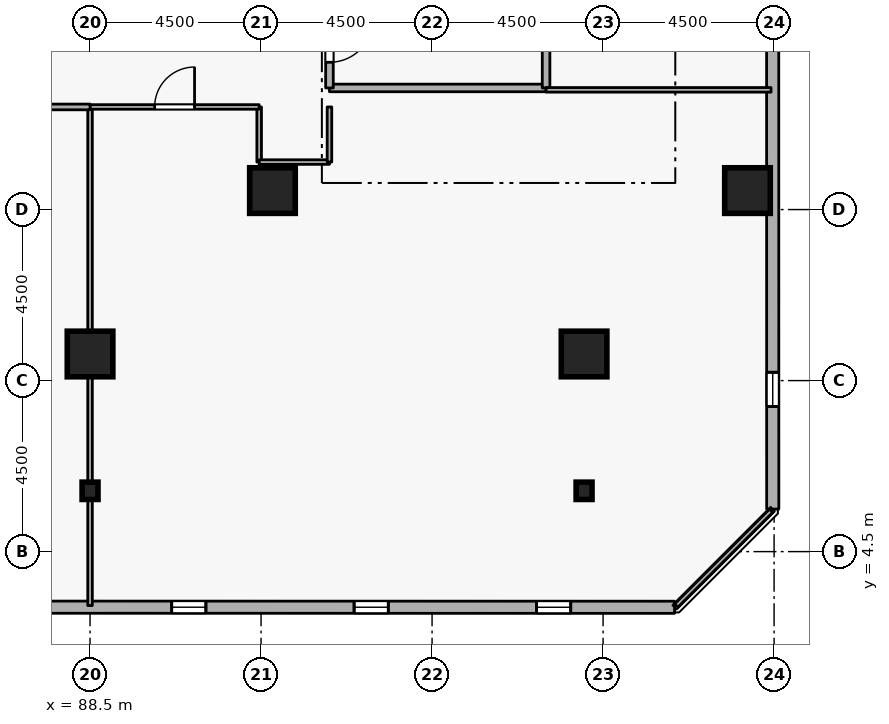
"""IFC4 building model, lengths in metres.
Left out: names, types, materials, properties, quantities, classifications, styles, units other than length and angle.
Written with IfcOpenShell. Run it as: python <this file> out.ifc"""

import sys

from ifc_helpers import new_model, si_unit, direction, frame, frame_2d, origin, origin_2d, place, context, subcontext, project, spatial, rectangle, i_section, extrude, element, fill, save


model = new_model("IFC4")
c1 = context("Model", 3, precision=1e-05, world=origin(), true_north=direction((0.0, 1.0)))
c2 = subcontext(c1, "Body", "Model", "MODEL_VIEW")
j1 = project(units=[si_unit("LENGTHUNIT", "METRE"), si_unit("PLANEANGLEUNIT", "RADIAN")], contexts=[c1])
p1 = place(None, origin())
s1 = spatial("IfcSite", under=j1, at=p1, CompositionType="ELEMENT")
p2 = place(p1, origin())
s2 = spatial("IfcBuilding", under=s1, at=p2, CompositionType="ELEMENT")
p3 = place(p2, frame((0.0, 0.0, 98.1)))
s3 = spatial("IfcBuildingStorey", under=s2, at=p3, CompositionType="ELEMENT", Elevation=98.1)
for number, where, z_axis, x_axis in (
    (1, (105.8, 14.0, 0.0), (0.0, 0.0, 1.0), (1.0, 0.0, 0.0)),
    (2, (101.5, 9.7, 0.0), (0.0, 0.0, 1.0), (1.0, 0.0, 0.0)),
    (3, (88.5, 9.7, 0.0), (0.0, 0.0, 1.0), (1.0, 0.0, 0.0)),
    (4, (93.3, 14.0, 0.0), (0.0, 0.0, 1.0), (1.0, 0.0, 0.0)),
):
    element("IfcColumn", number, at=place(p3, frame(where, z_axis=z_axis, x_axis=x_axis)), inside=s3, PredefinedType="COLUMN", context=c2, shape_type="SweptSolid", body=[
        extrude(rectangle(XDim=1.2, YDim=1.2, at=origin_2d()), origin(), (0.0, 0.0, 1.0), 3.6),
    ])
for number, where, z_axis, x_axis in (
    (5, (101.5, 6.1, 0.0), (0.0, 0.0, 1.0), (1.0, 0.0, 0.0)),
    (6, (88.5, 6.1, 0.0), (0.0, 0.0, 1.0), (1.0, 0.0, 0.0)),
):
    element("IfcColumn", number, at=place(p3, frame(where, z_axis=z_axis, x_axis=x_axis)), inside=s3, PredefinedType="COLUMN", context=c2, shape_type="SweptSolid", body=[
        extrude(i_section(OverallWidth=0.418, OverallDepth=0.456, WebThickness=0.042, FlangeThickness=0.067, FilletRadius=0.015, at=origin_2d()), origin(), (0.0, 0.0, 1.0), 3.6),
    ])
p4 = place(p3, frame((68.748, 3.041, 0.0), z_axis=(0.0, 0.0, 1.0), x_axis=(0.999999989352, -0.000145929605, 0.0)))
e7 = element("IfcWall", 7, at=p4, inside=s3, PredefinedType="STANDARD", context=c2, shape_type="SweptSolid", body=[
    extrude(rectangle(XDim=35.133, YDim=0.32, at=frame_2d((17.566, 0.0))), origin(), (0.0, 0.0, 1.0), 2.7),
])
p5 = place(p4, frame((2.7, 0.0, 0.72)))
e8 = element("IfcOpeningElement", 8, at=p5, cuts=e7, PredefinedType="OPENING", context=c2, shape_type="SweptSolid", body=[
    extrude(rectangle(XDim=0.9, YDim=1.75, at=frame_2d((0.45, 0.875))), frame((0.0, 0.17, 0.0), z_axis=(0.0, -1.0, 0.0), x_axis=(1.0, 0.0, 0.0)), (0.0, 0.0, 1.0), 0.34),
])
p6 = place(p4, frame((7.5, 0.0, 0.72)))
e9 = element("IfcOpeningElement", 9, at=p6, cuts=e7, PredefinedType="OPENING", context=c2, shape_type="SweptSolid", body=[
    extrude(rectangle(XDim=0.9, YDim=1.75, at=frame_2d((0.45, 0.875))), frame((0.0, 0.17, 0.0), z_axis=(0.0, -1.0, 0.0), x_axis=(1.0, 0.0, 0.0)), (0.0, 0.0, 1.0), 0.34),
])
p7 = place(p4, frame((12.3, 0.0, 0.72)))
e10 = element("IfcOpeningElement", 10, at=p7, cuts=e7, PredefinedType="OPENING", context=c2, shape_type="SweptSolid", body=[
    extrude(rectangle(XDim=0.9, YDim=1.75, at=frame_2d((0.45, 0.875))), frame((0.0, 0.17, 0.0), z_axis=(0.0, -1.0, 0.0), x_axis=(1.0, 0.0, 0.0)), (0.0, 0.0, 1.0), 0.34),
])
p8 = place(p4, frame((17.1, 0.0, 0.72)))
e11 = element("IfcOpeningElement", 11, at=p8, cuts=e7, PredefinedType="OPENING", context=c2, shape_type="SweptSolid", body=[
    extrude(rectangle(XDim=0.9, YDim=1.75, at=frame_2d((0.45, 0.875))), frame((0.0, 0.17, 0.0), z_axis=(0.0, -1.0, 0.0), x_axis=(1.0, 0.0, 0.0)), (0.0, 0.0, 1.0), 0.34),
])
p9 = place(p4, frame((21.9, 0.0, 0.72)))
e12 = element("IfcOpeningElement", 12, at=p9, cuts=e7, PredefinedType="OPENING", context=c2, shape_type="SweptSolid", body=[
    extrude(rectangle(XDim=0.9, YDim=1.75, at=frame_2d((0.45, 0.875))), frame((0.0, 0.17, 0.0), z_axis=(0.0, -1.0, 0.0), x_axis=(1.0, 0.0, 0.0)), (0.0, 0.0, 1.0), 0.34),
])
p10 = place(p4, frame((26.7, 0.0, 0.72)))
e13 = element("IfcOpeningElement", 13, at=p10, cuts=e7, PredefinedType="OPENING", context=c2, shape_type="SweptSolid", body=[
    extrude(rectangle(XDim=0.9, YDim=1.75, at=frame_2d((0.45, 0.875))), frame((0.0, 0.17, 0.0), z_axis=(0.0, -1.0, 0.0), x_axis=(1.0, 0.0, 0.0)), (0.0, 0.0, 1.0), 0.34),
])
p11 = place(p4, frame((31.5, 0.0, 0.72)))
e14 = element("IfcOpeningElement", 14, at=p11, cuts=e7, PredefinedType="OPENING", context=c2, shape_type="SweptSolid", body=[
    extrude(rectangle(XDim=0.9, YDim=1.75, at=frame_2d((0.45, 0.875))), frame((0.0, 0.17, 0.0), z_axis=(0.0, -1.0, 0.0), x_axis=(1.0, 0.0, 0.0)), (0.0, 0.0, 1.0), 0.34),
])
p12 = place(p3, frame((106.465, 5.619, 0.0), z_axis=(0.0, 0.0, 1.0), x_axis=(-0.000145929605, 0.999999989352, 0.0)))
e15 = element("IfcWall", 15, at=p12, inside=s3, PredefinedType="STANDARD", context=c2, shape_type="SweptSolid", body=[
    extrude(rectangle(XDim=35.133, YDim=0.32, at=frame_2d((17.566, 0.0))), origin(), (0.0, 0.0, 1.0), 2.7),
])
p13 = place(p12, frame((2.7, 0.0, 0.72)))
e16 = element("IfcOpeningElement", 16, at=p13, cuts=e15, PredefinedType="OPENING", context=c2, shape_type="SweptSolid", body=[
    extrude(rectangle(XDim=0.9, YDim=1.75, at=frame_2d((0.45, 0.875))), frame((0.0, 0.17, 0.0), z_axis=(0.0, -1.0, 0.0), x_axis=(1.0, 0.0, 0.0)), (0.0, 0.0, 1.0), 0.34),
])
p14 = place(p12, frame((12.3, 0.0, 0.72)))
e17 = element("IfcOpeningElement", 17, at=p14, cuts=e15, PredefinedType="OPENING", context=c2, shape_type="SweptSolid", body=[
    extrude(rectangle(XDim=0.9, YDim=1.75, at=frame_2d((0.45, 0.875))), frame((0.0, 0.17, 0.0), z_axis=(0.0, -1.0, 0.0), x_axis=(1.0, 0.0, 0.0)), (0.0, 0.0, 1.0), 0.34),
])
p15 = place(p12, frame((17.1, 0.0, 0.72)))
e18 = element("IfcOpeningElement", 18, at=p15, cuts=e15, PredefinedType="OPENING", context=c2, shape_type="SweptSolid", body=[
    extrude(rectangle(XDim=0.9, YDim=1.75, at=frame_2d((0.45, 0.875))), frame((0.0, 0.17, 0.0), z_axis=(0.0, -1.0, 0.0), x_axis=(1.0, 0.0, 0.0)), (0.0, 0.0, 1.0), 0.34),
])
p16 = place(p12, frame((26.7, 0.0, 0.72)))
e19 = element("IfcOpeningElement", 19, at=p16, cuts=e15, PredefinedType="OPENING", context=c2, shape_type="SweptSolid", body=[
    extrude(rectangle(XDim=0.9, YDim=1.75, at=frame_2d((0.45, 0.875))), frame((0.0, 0.17, 0.0), z_axis=(0.0, -1.0, 0.0), x_axis=(1.0, 0.0, 0.0)), (0.0, 0.0, 1.0), 0.34),
])
p17 = place(p12, frame((31.5, 0.0, 0.72)))
e20 = element("IfcOpeningElement", 20, at=p17, cuts=e15, PredefinedType="OPENING", context=c2, shape_type="SweptSolid", body=[
    extrude(rectangle(XDim=0.9, YDim=1.75, at=frame_2d((0.45, 0.875))), frame((0.0, 0.17, 0.0), z_axis=(0.0, -1.0, 0.0), x_axis=(1.0, 0.0, 0.0)), (0.0, 0.0, 1.0), 0.34),
])
p18 = place(p3, frame((94.8, 16.7, 0.0), z_axis=(0.0, 0.0, 1.0), x_axis=(1.0, 0.0, 0.0)))
e21 = element("IfcWall", 21, at=p18, inside=s3, PredefinedType="STANDARD", context=c2, shape_type="SweptSolid", body=[
    extrude(rectangle(XDim=5.7, YDim=0.2, at=frame_2d((2.85, 0.0))), origin(), (0.0, 0.0, 1.0), 3.3),
])
p19 = place(p3, frame((100.5, 16.7, 0.0), z_axis=(0.0, 0.0, 1.0), x_axis=(0.0, 1.0, 0.0)))
e22 = element("IfcWall", 22, at=p19, inside=s3, PredefinedType="STANDARD", context=c2, shape_type="SweptSolid", body=[
    extrude(rectangle(XDim=2.5, YDim=0.2, at=frame_2d((1.25, 0.0))), origin(), (0.0, 0.0, 1.0), 3.3),
])
p20 = place(p3, frame((94.8, 19.2, 0.0), z_axis=(0.0, 0.0, 1.0), x_axis=(0.0, -1.0, 0.0)))
e23 = element("IfcWall", 23, at=p20, inside=s3, PredefinedType="STANDARD", context=c2, shape_type="SweptSolid", body=[
    extrude(rectangle(XDim=2.5, YDim=0.2, at=frame_2d((1.25, 0.0))), origin(), (0.0, 0.0, 1.0), 3.3),
])
p21 = place(p20, frame((0.675, 0.0, 0.0)))
e24 = element("IfcOpeningElement", 24, at=p21, cuts=e23, PredefinedType="OPENING", context=c2, shape_type="SweptSolid", body=[
    extrude(rectangle(XDim=1.15, YDim=2.1, at=frame_2d((0.575, 1.05))), frame((0.0, 0.11, 0.0), z_axis=(0.0, -1.0, 0.0), x_axis=(1.0, 0.0, 0.0)), (0.0, 0.0, 1.0), 0.22),
])
p22 = place(p3, frame((92.95, 16.2, 0.0), z_axis=(0.0, 0.0, 1.0), x_axis=(0.0, -1.0, 0.0)))
e25 = element("IfcWall", 25, at=p22, inside=s3, PredefinedType="PARTITIONING", context=c2, shape_type="SweptSolid", body=[
    extrude(rectangle(XDim=1.45, YDim=0.12, at=frame_2d((0.725, 0.0))), origin(), (0.0, 0.0, 1.0), 3.3),
])
p23 = place(p3, frame((92.95, 14.75, 0.0), z_axis=(0.0, 0.0, 1.0), x_axis=(1.0, 0.0, 0.0)))
e26 = element("IfcWall", 26, at=p23, inside=s3, PredefinedType="PARTITIONING", context=c2, shape_type="SweptSolid", body=[
    extrude(rectangle(XDim=1.85, YDim=0.12, at=frame_2d((0.925, 0.0))), origin(), (0.0, 0.0, 1.0), 3.3),
])
p24 = place(p3, frame((94.8, 14.75, 0.0), z_axis=(0.0, 0.0, 1.0), x_axis=(0.0, 1.0, 0.0)))
e27 = element("IfcWall", 27, at=p24, inside=s3, PredefinedType="PARTITIONING", context=c2, shape_type="SweptSolid", body=[
    extrude(rectangle(XDim=1.45, YDim=0.12, at=frame_2d((0.725, 0.0))), origin(), (0.0, 0.0, 1.0), 3.3),
])
p25 = place(p3, frame((100.5, 16.65, 0.0), z_axis=(0.0, 0.0, 1.0), x_axis=(1.0, 0.0, 0.0)))
e28 = element("IfcWall", 28, at=p25, inside=s3, PredefinedType="PARTITIONING", context=c2, shape_type="SweptSolid", body=[
    extrude(rectangle(XDim=5.92, YDim=0.12, at=frame_2d((2.96, 0.0))), origin(), (0.0, 0.0, 1.0), 3.3),
])
p26 = place(p3, frame((106.42, 5.575, 0.0), z_axis=(0.0, 0.0, 1.0), x_axis=(-0.707106781187, -0.707106781187, 0.0)))
e29 = element("IfcWall", 29, at=p26, inside=s3, PredefinedType="PARTITIONING", context=c2, shape_type="SweptSolid", body=[
    extrude(rectangle(XDim=3.528, YDim=0.12, at=frame_2d((1.764, 0.0))), origin(), (0.0, 0.0, 1.0), 3.3),
])
p27 = place(p3, frame((88.5, 3.08, 0.0), z_axis=(0.0, 0.0, 1.0), x_axis=(0.0, 1.0, 0.0)))
e30 = element("IfcWall", 30, at=p27, inside=s3, PredefinedType="PARTITIONING", context=c2, shape_type="SweptSolid", body=[
    extrude(rectangle(XDim=13.12, YDim=0.12, at=frame_2d((6.56, 0.0))), origin(), (0.0, 0.0, 1.0), 2.838),
])
p28 = place(p3, frame((88.5, 16.2, 0.0), z_axis=(0.0, 0.0, 1.0), x_axis=(1.0, 0.0, 0.0)))
e31 = element("IfcWall", 31, at=p28, inside=s3, PredefinedType="PARTITIONING", context=c2, shape_type="SweptSolid", body=[
    extrude(rectangle(XDim=4.45, YDim=0.12, at=frame_2d((2.225, 0.0))), origin(), (0.0, 0.0, 1.0), 3.3),
])
p29 = place(p28, frame((1.7, 0.0, 0.0)))
e32 = element("IfcOpeningElement", 32, at=p29, cuts=e31, PredefinedType="OPENING", context=c2, shape_type="SweptSolid", body=[
    extrude(rectangle(XDim=1.05, YDim=2.1, at=frame_2d((0.525, 1.05))), frame((0.0, 0.07, 0.0), z_axis=(0.0, -1.0, 0.0), x_axis=(1.0, 0.0, 0.0)), (0.0, 0.0, 1.0), 0.14),
])
p30 = place(p3, frame((84.05, 16.2, 0.0), z_axis=(0.0, 0.0, 1.0), x_axis=(1.0, 0.0, 0.0)))
e33 = element("IfcWall", 33, at=p30, inside=s3, PredefinedType="PARTITIONING", context=c2, shape_type="SweptSolid", body=[
    extrude(rectangle(XDim=4.45, YDim=0.15, at=frame_2d((2.225, 0.0))), origin(), (0.0, 0.0, 1.0), 3.3),
])
p31 = place(p30, frame((1.575, 0.0, 0.0)))
e34 = element("IfcOpeningElement", 34, at=p31, cuts=e33, PredefinedType="OPENING", context=c2, shape_type="SweptSolid", body=[
    extrude(rectangle(XDim=1.3, YDim=2.12, at=frame_2d((0.65, 1.06))), frame((0.0, 0.085, 0.0), z_axis=(0.0, -1.0, 0.0), x_axis=(1.0, 0.0, 0.0)), (0.0, 0.0, 1.0), 0.17),
])
p32 = place(p9, origin())
e35 = element("IfcWindow", 35, at=p32, inside=s3, PartitioningType="SINGLE_PANEL", PredefinedType="WINDOW", context=c2, shape_type="SweptSolid", body=[
    extrude(rectangle(XDim=0.9, YDim=1.75, at=frame_2d((0.45, 0.875))), frame((0.0, 0.03, 0.0), z_axis=(0.0, -1.0, 0.0), x_axis=(1.0, 0.0, 0.0)), (0.0, 0.0, 1.0), 0.06),
])
fill(e12, e35)
p33 = place(p10, origin())
e36 = element("IfcWindow", 36, at=p33, inside=s3, PartitioningType="SINGLE_PANEL", PredefinedType="WINDOW", context=c2, shape_type="SweptSolid", body=[
    extrude(rectangle(XDim=0.9, YDim=1.75, at=frame_2d((0.45, 0.875))), frame((0.0, 0.03, 0.0), z_axis=(0.0, -1.0, 0.0), x_axis=(1.0, 0.0, 0.0)), (0.0, 0.0, 1.0), 0.06),
])
fill(e13, e36)
p34 = place(p11, origin())
e37 = element("IfcWindow", 37, at=p34, inside=s3, PartitioningType="SINGLE_PANEL", PredefinedType="WINDOW", context=c2, shape_type="SweptSolid", body=[
    extrude(rectangle(XDim=0.9, YDim=1.75, at=frame_2d((0.45, 0.875))), frame((0.0, 0.03, 0.0), z_axis=(0.0, -1.0, 0.0), x_axis=(1.0, 0.0, 0.0)), (0.0, 0.0, 1.0), 0.06),
])
fill(e14, e37)
p35 = place(p13, origin())
e38 = element("IfcWindow", 38, at=p35, inside=s3, PartitioningType="SINGLE_PANEL", PredefinedType="WINDOW", context=c2, shape_type="SweptSolid", body=[
    extrude(rectangle(XDim=0.9, YDim=1.75, at=frame_2d((0.45, 0.875))), frame((0.0, 0.03, 0.0), z_axis=(0.0, -1.0, 0.0), x_axis=(1.0, 0.0, 0.0)), (0.0, 0.0, 1.0), 0.06),
])
fill(e16, e38)
p36 = place(p21, origin())
e39 = element("IfcDoor", 39, at=p36, inside=s3, OperationType="SINGLE_SWING_LEFT", PredefinedType="DOOR", context=c2, shape_type="SweptSolid", body=[
    extrude(rectangle(XDim=1.15, YDim=2.1, at=frame_2d((0.575, 1.05))), frame((0.0, 0.025, 0.0), z_axis=(0.0, -1.0, 0.0), x_axis=(1.0, 0.0, 0.0)), (0.0, 0.0, 1.0), 0.05),
])
fill(e24, e39)
p37 = place(p29, origin())
e40 = element("IfcDoor", 40, at=p37, inside=s3, OperationType="SINGLE_SWING_RIGHT", PredefinedType="DOOR", context=c2, shape_type="SweptSolid", body=[
    extrude(rectangle(XDim=1.05, YDim=2.1, at=frame_2d((0.525, 1.05))), frame((0.0, 0.025, 0.0), z_axis=(0.0, -1.0, 0.0), x_axis=(1.0, 0.0, 0.0)), (0.0, 0.0, 1.0), 0.05),
])
fill(e32, e40)
save(model, sys.argv[1])
